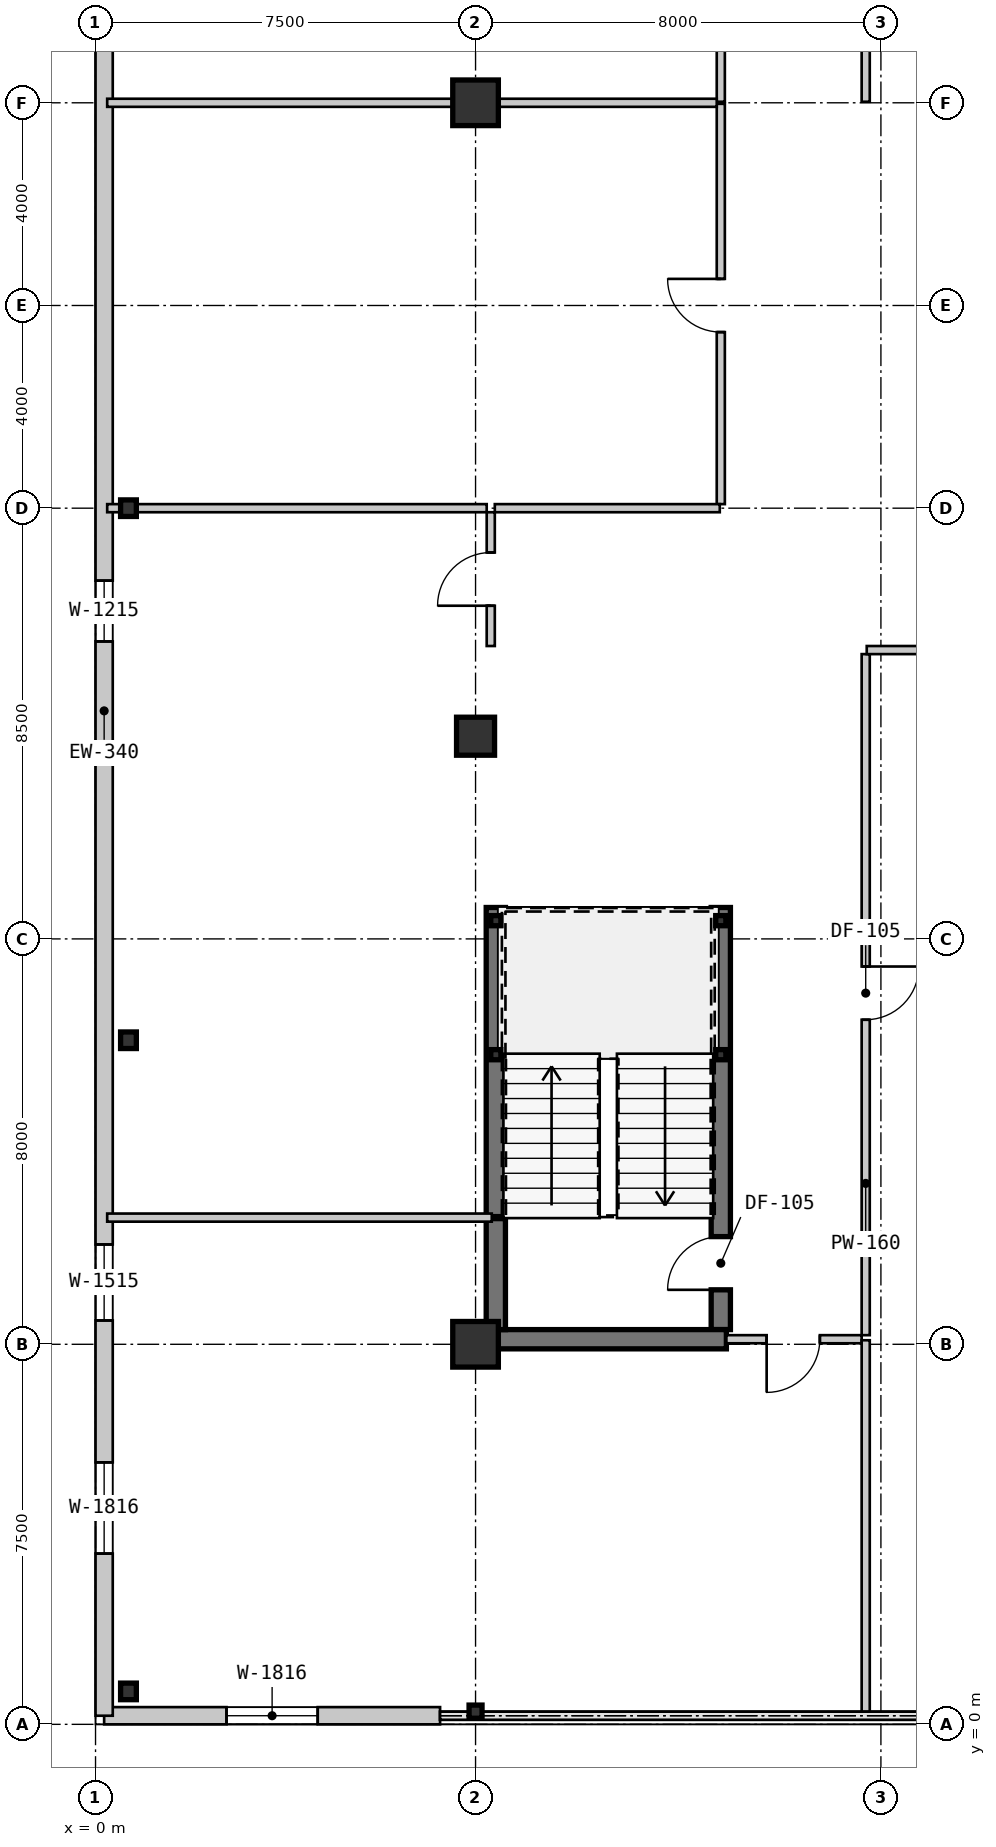
"""IFC4 building model, lengths in metres.
Left out: names, types, materials, properties, quantities, classifications, styles, units other than length and angle.
Written with IfcOpenShell. Run it as: python <this file> out.ifc"""

import sys

from ifc_helpers import new_model, si_unit, direction, frame, frame_2d, origin, origin_2d, place, context, subcontext, project, spatial, rectangle, hollow_rectangle, circle, i_section, extrude, source, transform, mapped, element, fill, save


model = new_model("IFC4")
c1 = context("Model", 3, precision=1e-05, world=origin(), true_north=direction((0.0, 1.0)))
c2 = subcontext(c1, "Body", "Model", "MODEL_VIEW")
j1 = project(units=[si_unit("LENGTHUNIT", "METRE"), si_unit("PLANEANGLEUNIT", "RADIAN")], contexts=[c1])
p1 = place(None, origin())
s1 = spatial("IfcSite", under=j1, at=p1, CompositionType="ELEMENT")
p2 = place(p1, origin())
s2 = spatial("IfcBuilding", under=s1, at=p2, CompositionType="ELEMENT")
p3 = place(p2, frame((0.0, 0.0, 8.4)))
s3 = spatial("IfcBuildingStorey", under=s2, at=p3, CompositionType="ELEMENT", Elevation=8.4)
m1 = source(origin(), c2, "Body", "SweptSolid", [
    extrude(circle(Radius=0.45, at=origin_2d()), origin(), (0.0, 0.0, 1.0), 4.55),
])
p4 = place(p3, frame((7.5, 7.5, 0.0), z_axis=(0.0, 0.0, 1.0), x_axis=(1.0, 0.0, 0.0)))
e1 = element("IfcColumn", 1, at=p4, inside=s3, PredefinedType="COLUMN", context=c2, shape_type="MappedRepresentation", body=[
    mapped(m1, transform((0.0, 0.0, 0.0), scale=1.0)),
])
m2 = source(origin(), c2, "Body", "SweptSolid", [
    extrude(circle(Radius=0.375, at=origin_2d()), origin(), (0.0, 0.0, 1.0), 4.55),
])
p5 = place(p3, frame((7.5, 19.5, 0.0), z_axis=(0.0, 0.0, 1.0), x_axis=(1.0, 0.0, 0.0)))
e2 = element("IfcColumn", 2, at=p5, inside=s3, PredefinedType="COLUMN", context=c2, shape_type="MappedRepresentation", body=[
    mapped(m2, transform((0.0, 0.0, 0.0), scale=1.0)),
])
p6 = place(p3, frame((7.5, 32.0, 0.0), z_axis=(0.0, 0.0, 1.0), x_axis=(1.0, 0.0, 0.0)))
e3 = element("IfcColumn", 3, at=p6, inside=s3, PredefinedType="COLUMN", context=c2, shape_type="MappedRepresentation", body=[
    mapped(m1, transform((0.0, 0.0, 0.0), scale=1.0)),
])
m3 = source(origin(), c2, "Body", "SweptSolid", [
    extrude(i_section(OverallWidth=0.311, OverallDepth=0.327, WebThickness=0.016, FlangeThickness=0.025, at=origin_2d()), origin(), (0.0, 0.0, 1.0), 4.55),
])
for number, where, z_axis, x_axis in (
    (4, (0.65, 0.65, 0.0), (0.0, 0.0, 1.0), (1.0, 0.0, 0.0)),
    (5, (0.65, 13.5, 0.0), (0.0, 0.0, 1.0), (1.0, 0.0, 0.0)),
    (6, (0.65, 24.0, 0.0), (0.0, 0.0, 1.0), (1.0, 0.0, 0.0)),
):
    element("IfcColumn", number, at=place(p3, frame(where, z_axis=z_axis, x_axis=x_axis)), inside=s3, PredefinedType="COLUMN", context=c2, shape_type="MappedRepresentation", body=[
        mapped(m3, transform((0.0, 0.0, 0.0), scale=1.0)),
    ])
m4 = source(origin(), c2, "Body", "SweptSolid", [
    extrude(hollow_rectangle(XDim=0.2, YDim=0.2, WallThickness=0.009, at=origin_2d()), origin(), (0.0, 0.0, 1.0), 4.55),
])
for number, where, z_axis, x_axis in (
    (7, (7.9, 13.215, 0.0), (0.0, 0.0, 1.0), (1.0, 0.0, 0.0)),
    (8, (12.34, 13.215, 0.0), (0.0, 0.0, 1.0), (1.0, 0.0, 0.0)),
    (9, (7.9, 15.86, 0.0), (0.0, 0.0, 1.0), (1.0, 0.0, 0.0)),
    (10, (12.34, 15.86, 0.0), (0.0, 0.0, 1.0), (1.0, 0.0, 0.0)),
):
    element("IfcColumn", number, at=place(p3, frame(where, z_axis=z_axis, x_axis=x_axis)), inside=s3, PredefinedType="COLUMN", context=c2, shape_type="MappedRepresentation", body=[
        mapped(m4, transform((0.0, 0.0, 0.0), scale=1.0)),
    ])
m5 = source(origin(), c2, "Body", "SweptSolid", [
    extrude(i_section(OverallWidth=0.256, OverallDepth=0.26, WebThickness=0.01, FlangeThickness=0.017, at=origin_2d()), origin(), (0.0, 0.0, 1.0), 4.55),
])
p7 = place(p3, frame((7.5, 0.25, 0.0), z_axis=(0.0, 0.0, 1.0), x_axis=(1.0, 0.0, 0.0)))
e11 = element("IfcColumn", 11, at=p7, inside=s3, PredefinedType="PILASTER", context=c2, shape_type="MappedRepresentation", body=[
    mapped(m5, transform((0.0, 0.0, 0.0), scale=1.0)),
])
m6 = source(origin(), c2, "Body", "SweptSolid", [
    extrude(rectangle(XDim=6.63, YDim=0.34, at=frame_2d((3.315, 0.0))), origin(), (0.0, 0.0, 1.0), 4.29),
])
p8 = place(p3, frame((0.17, 0.17, 0.0), z_axis=(0.0, 0.0, 1.0), x_axis=(1.0, 0.0, 0.0)))
e12 = element("IfcWall", 12, at=p8, inside=s3, PredefinedType="SOLIDWALL", context=c2, shape_type="MappedRepresentation", body=[
    mapped(m6, transform((0.0, 0.0, 0.0), scale=1.0)),
])
m7 = source(origin(), c2, "Body", "SweptSolid", [
    extrude(rectangle(XDim=1.8, YDim=1.6, at=frame_2d((0.9, 0.8))), frame((0.0, 0.18, 0.0), z_axis=(0.0, -1.0, 0.0), x_axis=(1.0, 0.0, 0.0)), (0.0, 0.0, 1.0), 0.36),
])
p9 = place(p8, frame((2.415, 0.0, 0.9)))
e13 = element("IfcOpeningElement", 13, at=p9, cuts=e12, PredefinedType="OPENING", context=c2, shape_type="MappedRepresentation", body=[
    mapped(m7, transform((0.0, 0.0, 0.0), scale=1.0)),
])
m8 = source(origin(), c2, "Body", "SweptSolid", [
    extrude(rectangle(XDim=39.66, YDim=0.34, at=frame_2d((19.83, 0.0))), origin(), (0.0, 0.0, 1.0), 4.29),
])
p10 = place(p3, frame((0.17, 0.17, 0.0), z_axis=(0.0, 0.0, 1.0), x_axis=(0.0, 1.0, 0.0)))
e14 = element("IfcWall", 14, at=p10, inside=s3, PredefinedType="SOLIDWALL", context=c2, shape_type="MappedRepresentation", body=[
    mapped(m8, transform((0.0, 0.0, 0.0), scale=1.0)),
])
p11 = place(p10, frame((3.2, 0.0, 0.95)))
e15 = element("IfcOpeningElement", 15, at=p11, cuts=e14, PredefinedType="OPENING", context=c2, shape_type="MappedRepresentation", body=[
    mapped(m7, transform((0.0, 0.0, 0.0), scale=1.0)),
])
m9 = source(origin(), c2, "Body", "SweptSolid", [
    extrude(rectangle(XDim=1.5, YDim=1.5, at=frame_2d((0.75, 0.75))), frame((0.0, 0.18, 0.0), z_axis=(0.0, -1.0, 0.0), x_axis=(1.0, 0.0, 0.0)), (0.0, 0.0, 1.0), 0.36),
])
p12 = place(p10, frame((7.8, 0.0, 0.95)))
e16 = element("IfcOpeningElement", 16, at=p12, cuts=e14, PredefinedType="OPENING", context=c2, shape_type="MappedRepresentation", body=[
    mapped(m9, transform((0.0, 0.0, 0.0), scale=1.0)),
])
m10 = source(origin(), c2, "Body", "SweptSolid", [
    extrude(rectangle(XDim=1.2, YDim=1.5, at=frame_2d((0.6, 0.75))), frame((0.0, 0.18, 0.0), z_axis=(0.0, -1.0, 0.0), x_axis=(1.0, 0.0, 0.0)), (0.0, 0.0, 1.0), 0.36),
])
p13 = place(p10, frame((21.2, 0.0, 0.95)))
e17 = element("IfcOpeningElement", 17, at=p13, cuts=e14, PredefinedType="OPENING", context=c2, shape_type="MappedRepresentation", body=[
    mapped(m10, transform((0.0, 0.0, 0.0), scale=1.0)),
])
m11 = source(origin(), c2, "Body", "SweptSolid", [
    extrude(rectangle(XDim=2.4, YDim=1.8, at=frame_2d((1.2, 0.9))), frame((0.0, 0.18, 0.0), z_axis=(0.0, -1.0, 0.0), x_axis=(1.0, 0.0, 0.0)), (0.0, 0.0, 1.0), 0.36),
])
p14 = place(p10, frame((34.6, 0.0, 0.95)))
e18 = element("IfcOpeningElement", 18, at=p14, cuts=e14, PredefinedType="OPENING", context=c2, shape_type="MappedRepresentation", body=[
    mapped(m11, transform((0.0, 0.0, 0.0), scale=1.0)),
])
m12 = source(origin(), c2, "Body", "SweptSolid", [
    extrude(rectangle(XDim=8.33, YDim=0.38, at=frame_2d((4.165, 0.0))), origin(), (0.0, 0.0, 1.0), 4.29),
])
p15 = place(p3, frame((12.34, 16.12, 0.0), z_axis=(0.0, 0.0, 1.0), x_axis=(0.0, -1.0, 0.0)))
e19 = element("IfcWall", 19, at=p15, inside=s3, PredefinedType="SHEAR", context=c2, shape_type="MappedRepresentation", body=[
    mapped(m12, transform((0.0, 0.0, 0.0), scale=1.0)),
])
m13 = source(origin(), c2, "Body", "SweptSolid", [
    extrude(rectangle(XDim=1.05, YDim=2.1, at=frame_2d((0.525, 1.05))), frame((0.0, 0.2, 0.0), z_axis=(0.0, -1.0, 0.0), x_axis=(1.0, 0.0, 0.0)), (0.0, 0.0, 1.0), 0.4),
])
p16 = place(p15, frame((6.495, 0.0, 0.0)))
e20 = element("IfcOpeningElement", 20, at=p16, cuts=e19, PredefinedType="OPENING", context=c2, shape_type="MappedRepresentation", body=[
    mapped(m13, transform((0.0, 0.0, 0.0), scale=1.0)),
])
m14 = source(origin(), c2, "Body", "SweptSolid", [
    extrude(rectangle(XDim=4.66, YDim=0.38, at=frame_2d((2.33, 0.0))), origin(), (0.0, 0.0, 1.0), 4.29),
])
p17 = place(p3, frame((12.45, 7.6, 0.0), z_axis=(0.0, 0.0, 1.0), x_axis=(-1.0, 0.0, 0.0)))
e21 = element("IfcWall", 21, at=p17, inside=s3, PredefinedType="SHEAR", context=c2, shape_type="MappedRepresentation", body=[
    mapped(m14, transform((0.0, 0.0, 0.0), scale=1.0)),
])
m15 = source(origin(), c2, "Body", "SweptSolid", [
    extrude(rectangle(XDim=2.19, YDim=0.38, at=frame_2d((1.095, 0.0))), origin(), (0.0, 0.0, 1.0), 4.29),
])
p18 = place(p3, frame((7.9, 7.79, 0.0), z_axis=(0.0, 0.0, 1.0), x_axis=(0.0, 1.0, 0.0)))
e22 = element("IfcWall", 22, at=p18, inside=s3, PredefinedType="SHEAR", context=c2, shape_type="MappedRepresentation", body=[
    mapped(m15, transform((0.0, 0.0, 0.0), scale=1.0)),
])
m16 = source(origin(), c2, "Body", "SweptSolid", [
    extrude(rectangle(XDim=6.1, YDim=0.38, at=frame_2d((3.05, 0.0))), origin(), (0.0, 0.0, 1.0), 4.29),
])
p19 = place(p3, frame((7.9, 10.02, 0.0), z_axis=(0.0, 0.0, 1.0), x_axis=(0.0, 1.0, 0.0)))
e23 = element("IfcWall", 23, at=p19, inside=s3, PredefinedType="SHEAR", context=c2, shape_type="MappedRepresentation", body=[
    mapped(m16, transform((0.0, 0.0, 0.0), scale=1.0)),
])
m17 = source(origin(), c2, "Body", "SweptSolid", [
    extrude(rectangle(XDim=13.44, YDim=0.16, at=frame_2d((6.72, 0.0))), origin(), (0.0, 0.0, 1.0), 4.29),
])
p20 = place(p3, frame((15.2, 21.12, 0.0), z_axis=(0.0, 0.0, 1.0), x_axis=(0.0, -1.0, 0.0)))
e24 = element("IfcWall", 24, at=p20, inside=s3, PredefinedType="PARTITIONING", context=c2, shape_type="MappedRepresentation", body=[
    mapped(m17, transform((0.0, 0.0, 0.0), scale=1.0)),
])
m18 = source(origin(), c2, "Body", "SweptSolid", [
    extrude(rectangle(XDim=1.05, YDim=2.1, at=frame_2d((0.525, 1.05))), frame((0.0, 0.09, 0.0), z_axis=(0.0, -1.0, 0.0), x_axis=(1.0, 0.0, 0.0)), (0.0, 0.0, 1.0), 0.18),
])
p21 = place(p20, frame((6.165, 0.0, 0.0)))
e25 = element("IfcOpeningElement", 25, at=p21, cuts=e24, PredefinedType="OPENING", context=c2, shape_type="MappedRepresentation", body=[
    mapped(m18, transform((0.0, 0.0, 0.0), scale=1.0)),
])
m19 = source(origin(), c2, "Body", "SweptSolid", [
    extrude(rectangle(XDim=7.56, YDim=0.16, at=frame_2d((3.78, 0.0))), origin(), (0.0, 0.0, 1.0), 4.29),
])
p22 = place(p3, frame((22.78, 21.2, 0.0), z_axis=(0.0, 0.0, 1.0), x_axis=(-1.0, 0.0, 0.0)))
e26 = element("IfcWall", 26, at=p22, inside=s3, PredefinedType="PARTITIONING", context=c2, shape_type="MappedRepresentation", body=[
    mapped(m19, transform((0.0, 0.0, 0.0), scale=1.0)),
])
m20 = source(origin(), c2, "Body", "SweptSolid", [
    extrude(rectangle(XDim=2.67, YDim=0.16, at=frame_2d((1.335, 0.0))), origin(), (0.0, 0.0, 1.0), 4.29),
])
p23 = place(p3, frame((15.12, 7.6, 0.0), z_axis=(0.0, 0.0, 1.0), x_axis=(-1.0, 0.0, 0.0)))
e27 = element("IfcWall", 27, at=p23, inside=s3, PredefinedType="PARTITIONING", context=c2, shape_type="MappedRepresentation", body=[
    mapped(m20, transform((0.0, 0.0, 0.0), scale=1.0)),
])
p24 = place(p23, frame((0.825, 0.0, 0.0)))
e28 = element("IfcOpeningElement", 28, at=p24, cuts=e27, PredefinedType="OPENING", context=c2, shape_type="MappedRepresentation", body=[
    mapped(m18, transform((0.0, 0.0, 0.0), scale=1.0)),
])
m21 = source(origin(), c2, "Body", "SweptSolid", [
    extrude(rectangle(XDim=2.64, YDim=0.16, at=frame_2d((1.32, 0.0))), origin(), (0.0, 0.0, 1.0), 4.29),
])
p25 = place(p3, frame((7.8, 21.28, 0.0), z_axis=(0.0, 0.0, 1.0), x_axis=(0.0, 1.0, 0.0)))
e29 = element("IfcWall", 29, at=p25, inside=s3, PredefinedType="PARTITIONING", context=c2, shape_type="MappedRepresentation", body=[
    mapped(m21, transform((0.0, 0.0, 0.0), scale=1.0)),
])
p26 = place(p25, frame((0.795, 0.0, 0.0)))
e30 = element("IfcOpeningElement", 30, at=p26, cuts=e29, PredefinedType="OPENING", context=c2, shape_type="MappedRepresentation", body=[
    mapped(m18, transform((0.0, 0.0, 0.0), scale=1.0)),
])
m22 = source(origin(), c2, "Body", "SweptSolid", [
    extrude(rectangle(XDim=7.9, YDim=0.16, at=frame_2d((3.95, 0.0))), origin(), (0.0, 0.0, 1.0), 4.29),
])
p27 = place(p3, frame((12.34, 24.08, 0.0), z_axis=(0.0, 0.0, 1.0), x_axis=(0.0, 1.0, 0.0)))
e31 = element("IfcWall", 31, at=p27, inside=s3, PredefinedType="PARTITIONING", context=c2, shape_type="MappedRepresentation", body=[
    mapped(m22, transform((0.0, 0.0, 0.0), scale=1.0)),
])
p28 = place(p27, frame((3.395, 0.0, 0.0)))
e32 = element("IfcOpeningElement", 32, at=p28, cuts=e31, PredefinedType="OPENING", context=c2, shape_type="MappedRepresentation", body=[
    mapped(m18, transform((0.0, 0.0, 0.0), scale=1.0)),
])
m23 = source(origin(), c2, "Body", "SweptSolid", [
    extrude(rectangle(XDim=4.44, YDim=0.16, at=frame_2d((2.22, 0.0))), origin(), (0.0, 0.0, 1.0), 4.29),
])
p29 = place(p3, frame((7.88, 24.0, 0.0), z_axis=(0.0, 0.0, 1.0), x_axis=(1.0, 0.0, 0.0)))
e33 = element("IfcWall", 33, at=p29, inside=s3, PredefinedType="PARTITIONING", context=c2, shape_type="MappedRepresentation", body=[
    mapped(m23, transform((0.0, 0.0, 0.0), scale=1.0)),
])
m24 = source(origin(), c2, "Body", "SweptSolid", [
    extrude(rectangle(XDim=3.9, YDim=0.16, at=frame_2d((1.95, 0.0))), origin(), (0.0, 0.0, 1.0), 4.29),
])
p30 = place(p3, frame((12.34, 32.02, 0.0), z_axis=(0.0, 0.0, 1.0), x_axis=(0.0, 1.0, 0.0)))
e34 = element("IfcWall", 34, at=p30, inside=s3, PredefinedType="PARTITIONING", context=c2, shape_type="MappedRepresentation", body=[
    mapped(m24, transform((0.0, 0.0, 0.0), scale=1.0)),
])
p31 = place(p30, frame((1.425, 0.0, 0.0)))
e35 = element("IfcOpeningElement", 35, at=p31, cuts=e34, PredefinedType="OPENING", context=c2, shape_type="MappedRepresentation", body=[
    mapped(m18, transform((0.0, 0.0, 0.0), scale=1.0)),
])
p32 = place(p3, frame((15.2, 35.92, 0.0), z_axis=(0.0, 0.0, 1.0), x_axis=(0.0, -1.0, 0.0)))
e36 = element("IfcWall", 36, at=p32, inside=s3, PredefinedType="PARTITIONING", context=c2, shape_type="MappedRepresentation", body=[
    mapped(m24, transform((0.0, 0.0, 0.0), scale=1.0)),
])
m25 = source(origin(), c2, "Body", "SweptSolid", [
    extrude(rectangle(XDim=7.35, YDim=0.16, at=frame_2d((3.675, 0.0))), origin(), (0.0, 0.0, 1.0), 4.29),
])
p33 = place(p3, frame((15.2, 0.23, 0.0), z_axis=(0.0, 0.0, 1.0), x_axis=(0.0, 1.0, 0.0)))
e37 = element("IfcWall", 37, at=p33, inside=s3, PredefinedType="PARTITIONING", context=c2, shape_type="MappedRepresentation", body=[
    mapped(m25, transform((0.0, 0.0, 0.0), scale=1.0)),
])
m26 = source(origin(), c2, "Body", "SweptSolid", [
    extrude(rectangle(XDim=7.59, YDim=0.16, at=frame_2d((3.795, 0.0))), origin(), (0.0, 0.0, 1.0), 4.29),
])
p34 = place(p3, frame((0.23, 10.0, 0.0), z_axis=(0.0, 0.0, 1.0), x_axis=(1.0, 0.0, 0.0)))
e38 = element("IfcWall", 38, at=p34, inside=s3, PredefinedType="PARTITIONING", context=c2, shape_type="MappedRepresentation", body=[
    mapped(m26, transform((0.0, 0.0, 0.0), scale=1.0)),
])
m27 = source(origin(), c2, "Body", "SweptSolid", [
    extrude(rectangle(XDim=7.49, YDim=0.16, at=frame_2d((3.745, 0.0))), origin(), (0.0, 0.0, 1.0), 4.29),
])
p35 = place(p3, frame((0.23, 24.0, 0.0), z_axis=(0.0, 0.0, 1.0), x_axis=(1.0, 0.0, 0.0)))
e39 = element("IfcWall", 39, at=p35, inside=s3, PredefinedType="PARTITIONING", context=c2, shape_type="MappedRepresentation", body=[
    mapped(m27, transform((0.0, 0.0, 0.0), scale=1.0)),
])
m28 = source(origin(), c2, "Body", "SweptSolid", [
    extrude(rectangle(XDim=7.27, YDim=0.16, at=frame_2d((3.635, 0.0))), origin(), (0.0, 0.0, 1.0), 4.29),
])
p36 = place(p3, frame((0.23, 32.0, 0.0), z_axis=(0.0, 0.0, 1.0), x_axis=(1.0, 0.0, 0.0)))
e40 = element("IfcWall", 40, at=p36, inside=s3, PredefinedType="PARTITIONING", context=c2, shape_type="MappedRepresentation", body=[
    mapped(m28, transform((0.0, 0.0, 0.0), scale=1.0)),
])
m29 = source(origin(), c2, "Body", "SweptSolid", [
    extrude(rectangle(XDim=4.76, YDim=0.16, at=frame_2d((2.38, 0.0))), origin(), (0.0, 0.0, 1.0), 3.757),
])
p37 = place(p3, frame((7.5, 32.0, 0.0), z_axis=(0.0, 0.0, 1.0), x_axis=(1.0, 0.0, 0.0)))
e41 = element("IfcWall", 41, at=p37, inside=s3, PredefinedType="PARTITIONING", context=c2, shape_type="MappedRepresentation", body=[
    mapped(m29, transform((0.0, 0.0, 0.0), scale=1.0)),
])
m30 = source(origin(), c2, "Body", "SweptSolid", [
    extrude(rectangle(XDim=1.8, YDim=1.6, at=frame_2d((0.9, 0.8))), frame((0.0, 0.03, 0.0), z_axis=(0.0, -1.0, 0.0), x_axis=(1.0, 0.0, 0.0)), (0.0, 0.0, 1.0), 0.06),
])
p38 = place(p9, origin())
e42 = element("IfcWindow", 42, at=p38, inside=s3, PartitioningType="SINGLE_PANEL", PredefinedType="WINDOW", context=c2, shape_type="MappedRepresentation", body=[
    mapped(m30, transform((0.0, 0.0, 0.0), scale=1.0)),
])
fill(e13, e42)
p39 = place(p11, origin())
e43 = element("IfcWindow", 43, at=p39, inside=s3, PartitioningType="SINGLE_PANEL", PredefinedType="WINDOW", context=c2, shape_type="MappedRepresentation", body=[
    mapped(m30, transform((0.0, 0.0, 0.0), scale=1.0)),
])
fill(e15, e43)
m31 = source(origin(), c2, "Body", "SweptSolid", [
    extrude(rectangle(XDim=1.5, YDim=1.5, at=frame_2d((0.75, 0.75))), frame((0.0, 0.03, 0.0), z_axis=(0.0, -1.0, 0.0), x_axis=(1.0, 0.0, 0.0)), (0.0, 0.0, 1.0), 0.06),
])
p40 = place(p12, origin())
e44 = element("IfcWindow", 44, at=p40, inside=s3, PartitioningType="SINGLE_PANEL", PredefinedType="WINDOW", context=c2, shape_type="MappedRepresentation", body=[
    mapped(m31, transform((0.0, 0.0, 0.0), scale=1.0)),
])
fill(e16, e44)
m32 = source(origin(), c2, "Body", "SweptSolid", [
    extrude(rectangle(XDim=1.2, YDim=1.5, at=frame_2d((0.6, 0.75))), frame((0.0, 0.03, 0.0), z_axis=(0.0, -1.0, 0.0), x_axis=(1.0, 0.0, 0.0)), (0.0, 0.0, 1.0), 0.06),
])
p41 = place(p13, origin())
e45 = element("IfcWindow", 45, at=p41, inside=s3, PartitioningType="SINGLE_PANEL", PredefinedType="WINDOW", context=c2, shape_type="MappedRepresentation", body=[
    mapped(m32, transform((0.0, 0.0, 0.0), scale=1.0)),
])
fill(e17, e45)
m33 = source(origin(), c2, "Body", "SweptSolid", [
    extrude(rectangle(XDim=1.05, YDim=2.1, at=frame_2d((0.525, 1.05))), frame((0.0, 0.025, 0.0), z_axis=(0.0, -1.0, 0.0), x_axis=(1.0, 0.0, 0.0)), (0.0, 0.0, 1.0), 0.05),
])
p42 = place(p16, frame((1.05, 0.0, 0.0), z_axis=(0.0, 0.0, 1.0), x_axis=(-1.0, 0.0, 0.0)))
e46 = element("IfcDoor", 46, at=p42, inside=s3, OperationType="SINGLE_SWING_LEFT", PredefinedType="DOOR", context=c2, shape_type="MappedRepresentation", body=[
    mapped(m33, transform((0.0, 0.0, 0.0), scale=1.0)),
])
fill(e20, e46)
p43 = place(p21, origin())
e47 = element("IfcDoor", 47, at=p43, inside=s3, OperationType="SINGLE_SWING_LEFT", PredefinedType="DOOR", context=c2, shape_type="MappedRepresentation", body=[
    mapped(m33, transform((0.0, 0.0, 0.0), scale=1.0)),
])
fill(e25, e47)
p44 = place(p24, origin())
e48 = element("IfcDoor", 48, at=p44, inside=s3, OperationType="SINGLE_SWING_RIGHT", PredefinedType="DOOR", context=c2, shape_type="MappedRepresentation", body=[
    mapped(m33, transform((0.0, 0.0, 0.0), scale=1.0)),
])
fill(e28, e48)
p45 = place(p26, origin())
e49 = element("IfcDoor", 49, at=p45, inside=s3, OperationType="SINGLE_SWING_LEFT", PredefinedType="DOOR", context=c2, shape_type="MappedRepresentation", body=[
    mapped(m33, transform((0.0, 0.0, 0.0), scale=1.0)),
])
fill(e30, e49)
p46 = place(p28, origin())
e50 = element("IfcDoor", 50, at=p46, inside=s3, OperationType="SINGLE_SWING_RIGHT", PredefinedType="DOOR", context=c2, shape_type="MappedRepresentation", body=[
    mapped(m33, transform((0.0, 0.0, 0.0), scale=1.0)),
])
fill(e32, e50)
save(model, sys.argv[1])
